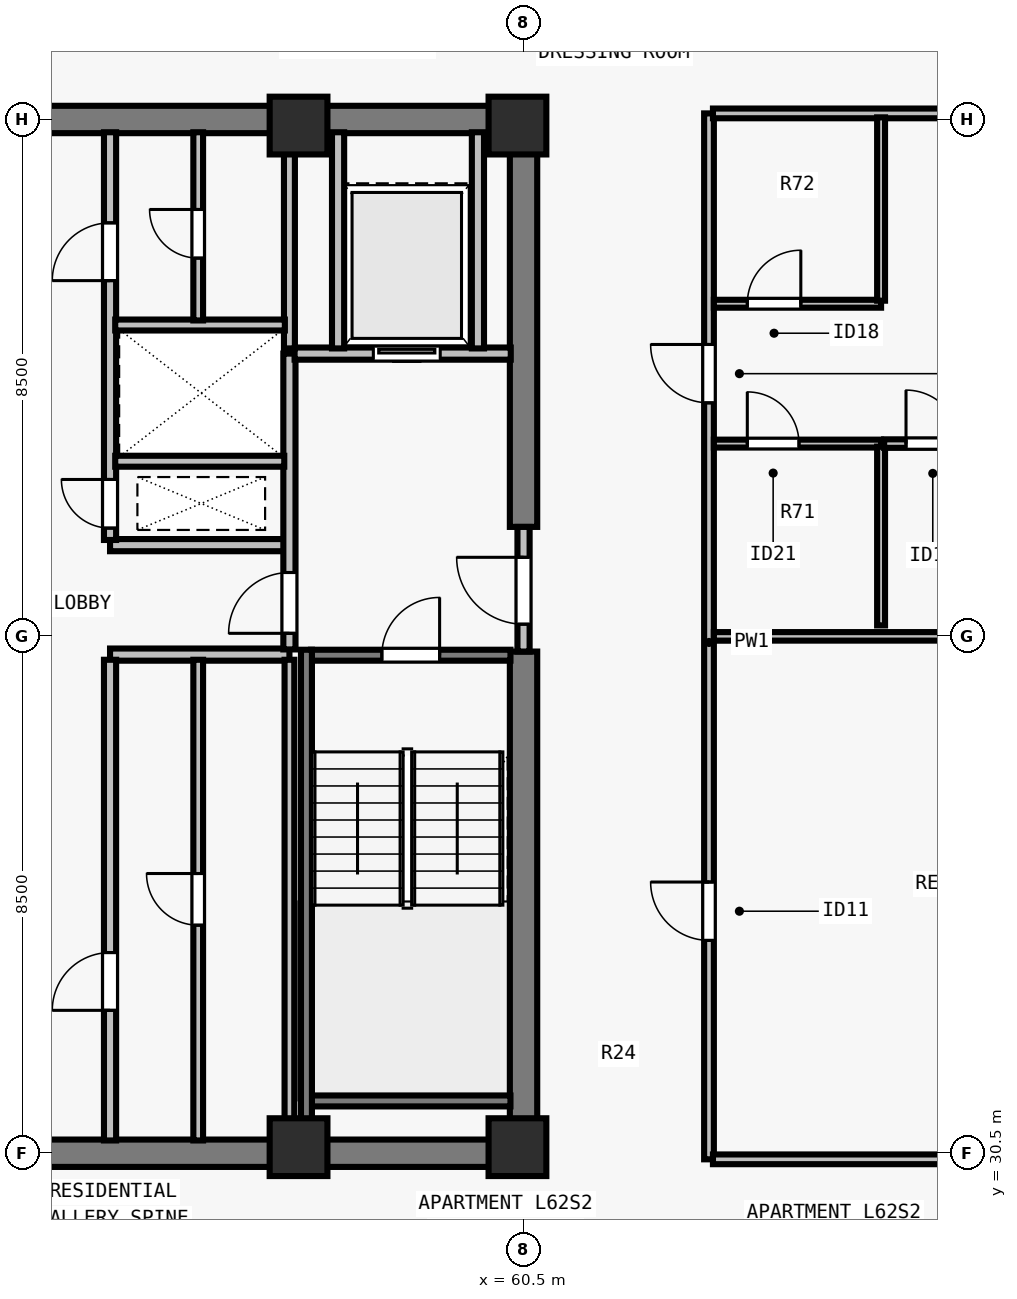
"""IFC4 building model, lengths in metres.
Left out: names, types, materials, properties, quantities, classifications, styles, units other than length and angle.
Written with IfcOpenShell. Run it as: python <this file> out.ifc"""

import sys

from ifc_helpers import new_model, si_unit, direction, frame, frame_2d, origin, origin_2d, place, context, subcontext, project, spatial, rectangle, extrude, element, fill, save


model = new_model("IFC4")
c1 = context("Model", 3, precision=1e-05, world=origin(), true_north=direction((0.0, 1.0)))
c2 = subcontext(c1, "Body", "Model", "MODEL_VIEW")
j1 = project(units=[si_unit("LENGTHUNIT", "METRE"), si_unit("PLANEANGLEUNIT", "RADIAN")], contexts=[c1])
p1 = place(None, origin())
s1 = spatial("IfcSite", under=j1, at=p1, CompositionType="ELEMENT")
p2 = place(p1, origin())
s2 = spatial("IfcBuilding", under=s1, at=p2, CompositionType="ELEMENT")
p3 = place(p2, frame((0.0, 0.0, 227.0)))
s3 = spatial("IfcBuildingStorey", under=s2, at=p3, CompositionType="ELEMENT", Elevation=227.0)
for number, where, z_axis, x_axis in (
    (1, (56.8, 30.6, 0.0), (0.0, 0.0, 1.0), (1.0, 0.0, 0.0)),
    (2, (60.4, 30.6, 0.0), (0.0, 0.0, 1.0), (1.0, 0.0, 0.0)),
    (3, (56.8, 47.4, 0.0), (0.0, 0.0, 1.0), (1.0, 0.0, 0.0)),
    (4, (60.4, 47.4, 0.0), (0.0, 0.0, 1.0), (1.0, 0.0, 0.0)),
):
    element("IfcColumn", number, at=place(p3, frame(where, z_axis=z_axis, x_axis=x_axis)), inside=s3, PredefinedType="COLUMN", context=c2, shape_type="SweptSolid", body=[
        extrude(rectangle(XDim=0.95, YDim=0.95, at=origin_2d()), origin(), (0.0, 0.0, 1.0), 3.5),
    ])
for number, where, z_axis, x_axis in (
    (5, (43.275, 30.5, 0.0), (0.0, 0.0, 1.0), (1.0, 0.0, 0.0)),
    (6, (43.275, 47.5, 0.0), (0.0, 0.0, 1.0), (1.0, 0.0, 0.0)),
):
    element("IfcWall", number, at=place(p3, frame(where, z_axis=z_axis, x_axis=x_axis)), inside=s3, PredefinedType="SHEAR", context=c2, shape_type="SweptSolid", body=[
        extrude(rectangle(XDim=17.45, YDim=0.45, at=frame_2d((8.725, 0.0))), origin(), (0.0, 0.0, 1.0), 3.29),
    ])
p4 = place(p3, frame((60.5, 30.715, 0.0), z_axis=(0.0, 0.0, 1.0), x_axis=(0.0, 1.0, 0.0)))
e7 = element("IfcWall", 7, at=p4, inside=s3, PredefinedType="SHEAR", context=c2, shape_type="SweptSolid", body=[
    extrude(rectangle(XDim=8.035, YDim=0.45, at=frame_2d((4.018, 0.0))), origin(), (0.0, 0.0, 1.0), 3.29),
])
p5 = place(p3, frame((60.5, 40.8, 0.0), z_axis=(0.0, 0.0, 1.0), x_axis=(0.0, 1.0, 0.0)))
e8 = element("IfcWall", 8, at=p5, inside=s3, PredefinedType="SHEAR", context=c2, shape_type="SweptSolid", body=[
    extrude(rectangle(XDim=6.485, YDim=0.45, at=frame_2d((3.242, 0.0))), origin(), (0.0, 0.0, 1.0), 3.29),
])
for number, where, z_axis, x_axis in (
    (9, (53.7, 38.7, 0.0), (0.0, 0.0, 1.0), (1.0, 0.0, 0.0)),
    (10, (53.7, 40.5, 0.0), (0.0, 0.0, 1.0), (1.0, 0.0, 0.0)),
):
    element("IfcWall", number, at=place(p3, frame(where, z_axis=z_axis, x_axis=x_axis)), inside=s3, PredefinedType="SOLIDWALL", context=c2, shape_type="SweptSolid", body=[
        extrude(rectangle(XDim=2.95, YDim=0.2, at=frame_2d((1.475, 0.0))), origin(), (0.0, 0.0, 1.0), 3.29),
    ])
p6 = place(p3, frame((53.7, 30.71, 0.0), z_axis=(0.0, 0.0, 1.0), x_axis=(0.0, 1.0, 0.0)))
e11 = element("IfcWall", 11, at=p6, inside=s3, PredefinedType="SOLIDWALL", context=c2, shape_type="SweptSolid", body=[
    extrude(rectangle(XDim=7.905, YDim=0.2, at=frame_2d((3.953, 0.0))), origin(), (0.0, 0.0, 1.0), 3.29),
])
p7 = place(p6, frame((2.14, 0.0, 0.0)))
e12 = element("IfcOpeningElement", 12, at=p7, cuts=e11, PredefinedType="OPENING", context=c2, shape_type="SweptSolid", body=[
    extrude(rectangle(XDim=0.95, YDim=2.12, at=frame_2d((0.475, 1.06))), frame((0.0, 0.11, 0.0), z_axis=(0.0, -1.0, 0.0), x_axis=(1.0, 0.0, 0.0)), (0.0, 0.0, 1.0), 0.22),
])
p8 = place(p3, frame((53.7, 40.585, 0.0), z_axis=(0.0, 0.0, 1.0), x_axis=(0.0, 1.0, 0.0)))
e13 = element("IfcWall", 13, at=p8, inside=s3, PredefinedType="SOLIDWALL", context=c2, shape_type="SweptSolid", body=[
    extrude(rectangle(XDim=6.705, YDim=0.2, at=frame_2d((3.353, 0.0))), origin(), (0.0, 0.0, 1.0), 3.29),
])
p9 = place(p8, frame((0.195, 0.0, 0.0)))
e14 = element("IfcOpeningElement", 14, at=p9, cuts=e13, PredefinedType="OPENING", context=c2, shape_type="SweptSolid", body=[
    extrude(rectangle(XDim=0.8, YDim=2.08, at=frame_2d((0.4, 1.04))), frame((0.0, 0.11, 0.0), z_axis=(0.0, -1.0, 0.0), x_axis=(1.0, 0.0, 0.0)), (0.0, 0.0, 1.0), 0.22),
])
p10 = place(p8, frame((4.265, 0.0, 0.0)))
e15 = element("IfcOpeningElement", 15, at=p10, cuts=e13, PredefinedType="OPENING", context=c2, shape_type="SweptSolid", body=[
    extrude(rectangle(XDim=0.95, YDim=2.12, at=frame_2d((0.475, 1.06))), frame((0.0, 0.11, 0.0), z_axis=(0.0, -1.0, 0.0), x_axis=(1.0, 0.0, 0.0)), (0.0, 0.0, 1.0), 0.22),
])
p11 = place(p3, frame((60.5, 38.75, 0.0), z_axis=(0.0, 0.0, 1.0), x_axis=(0.0, 1.0, 0.0)))
e16 = element("IfcWall", 16, at=p11, inside=s3, PredefinedType="SOLIDWALL", context=c2, shape_type="SweptSolid", body=[
    extrude(rectangle(XDim=2.05, YDim=0.2, at=frame_2d((1.025, 0.0))), origin(), (0.0, 0.0, 1.0), 3.29),
])
p12 = place(p11, frame((0.45, 0.0, 0.0)))
e17 = element("IfcOpeningElement", 17, at=p12, cuts=e16, PredefinedType="OPENING", context=c2, shape_type="SweptSolid", body=[
    extrude(rectangle(XDim=1.1, YDim=2.15, at=frame_2d((0.55, 1.075))), frame((0.0, 0.11, 0.0), z_axis=(0.0, -1.0, 0.0), x_axis=(1.0, 0.0, 0.0)), (0.0, 0.0, 1.0), 0.22),
])
p13 = place(p3, frame((56.65, 38.785, 0.0), z_axis=(0.0, 0.0, 1.0), x_axis=(0.0, 1.0, 0.0)))
e18 = element("IfcWall", 18, at=p13, inside=s3, PredefinedType="SOLIDWALL", context=c2, shape_type="SweptSolid", body=[
    extrude(rectangle(XDim=4.865, YDim=0.2, at=frame_2d((2.433, 0.0))), origin(), (0.0, 0.0, 1.0), 3.29),
])
p14 = place(p13, frame((0.265, 0.0, 0.0)))
e19 = element("IfcOpeningElement", 19, at=p14, cuts=e18, PredefinedType="OPENING", context=c2, shape_type="SweptSolid", body=[
    extrude(rectangle(XDim=1.0, YDim=2.15, at=frame_2d((0.5, 1.075))), frame((0.0, 0.11, 0.0), z_axis=(0.0, -1.0, 0.0), x_axis=(1.0, 0.0, 0.0)), (0.0, 0.0, 1.0), 0.22),
])
p15 = place(p3, frame((56.735, 43.65, 0.0), z_axis=(0.0, 0.0, 1.0), x_axis=(1.0, 0.0, 0.0)))
e20 = element("IfcWall", 20, at=p15, inside=s3, PredefinedType="SOLIDWALL", context=c2, shape_type="SweptSolid", body=[
    extrude(rectangle(XDim=3.555, YDim=0.2, at=frame_2d((1.777, 0.0))), origin(), (0.0, 0.0, 1.0), 3.29),
])
p16 = place(p15, frame((1.295, 0.0, 0.0)))
e21 = element("IfcOpeningElement", 21, at=p16, cuts=e20, PredefinedType="OPENING", context=c2, shape_type="SweptSolid", body=[
    extrude(rectangle(XDim=1.1, YDim=2.2, at=frame_2d((0.55, 1.1))), frame((0.0, 0.11, 0.0), z_axis=(0.0, -1.0, 0.0), x_axis=(1.0, 0.0, 0.0)), (0.0, 0.0, 1.0), 0.22),
])
for number, where, z_axis, x_axis in (
    (22, (57.45, 43.735, 0.0), (0.0, 0.0, 1.0), (0.0, 1.0, 0.0)),
    (23, (59.75, 43.735, 0.0), (0.0, 0.0, 1.0), (0.0, 1.0, 0.0)),
):
    element("IfcWall", number, at=place(p3, frame(where, z_axis=z_axis, x_axis=x_axis)), inside=s3, PredefinedType="SOLIDWALL", context=c2, shape_type="SweptSolid", body=[
        extrude(rectangle(XDim=3.555, YDim=0.2, at=frame_2d((1.777, 0.0))), origin(), (0.0, 0.0, 1.0), 3.29),
    ])
p17 = place(p3, frame((56.65, 30.71, 0.0), z_axis=(0.0, 0.0, 1.0), x_axis=(0.0, 1.0, 0.0)))
e24 = element("IfcWall", 24, at=p17, inside=s3, PredefinedType="PARTITIONING", context=c2, shape_type="SweptSolid", body=[
    extrude(rectangle(XDim=7.905, YDim=0.16, at=frame_2d((3.953, 0.0))), origin(), (0.0, 0.0, 1.0), 3.29),
])
p18 = place(p3, frame((55.15, 30.71, 0.0), z_axis=(0.0, 0.0, 1.0), x_axis=(0.0, 1.0, 0.0)))
e25 = element("IfcWall", 25, at=p18, inside=s3, PredefinedType="PARTITIONING", context=c2, shape_type="SweptSolid", body=[
    extrude(rectangle(XDim=7.905, YDim=0.16, at=frame_2d((3.953, 0.0))), origin(), (0.0, 0.0, 1.0), 3.29),
])
p19 = place(p18, frame((3.54, 0.0, 0.0)))
e26 = element("IfcOpeningElement", 26, at=p19, cuts=e25, PredefinedType="OPENING", context=c2, shape_type="SweptSolid", body=[
    extrude(rectangle(XDim=0.85, YDim=2.12, at=frame_2d((0.425, 1.06))), frame((0.0, 0.09, 0.0), z_axis=(0.0, -1.0, 0.0), x_axis=(1.0, 0.0, 0.0)), (0.0, 0.0, 1.0), 0.18),
])
p20 = place(p3, frame((56.65, 43.735, 0.0), z_axis=(0.0, 0.0, 1.0), x_axis=(0.0, 1.0, 0.0)))
e27 = element("IfcWall", 27, at=p20, inside=s3, PredefinedType="SOLIDWALL", context=c2, shape_type="SweptSolid", body=[
    extrude(rectangle(XDim=3.555, YDim=0.18, at=frame_2d((1.777, 0.0))), origin(), (0.0, 0.0, 1.0), 3.29),
])
p21 = place(p3, frame((53.785, 41.88, 0.0), z_axis=(0.0, 0.0, 1.0), x_axis=(1.0, 0.0, 0.0)))
e28 = element("IfcWall", 28, at=p21, inside=s3, PredefinedType="SOLIDWALL", context=c2, shape_type="SweptSolid", body=[
    extrude(rectangle(XDim=2.78, YDim=0.18, at=frame_2d((1.39, 0.0))), origin(), (0.0, 0.0, 1.0), 3.29),
])
p22 = place(p3, frame((53.785, 44.12, 0.0), z_axis=(0.0, 0.0, 1.0), x_axis=(1.0, 0.0, 0.0)))
e29 = element("IfcWall", 29, at=p22, inside=s3, PredefinedType="SOLIDWALL", context=c2, shape_type="SweptSolid", body=[
    extrude(rectangle(XDim=2.79, YDim=0.18, at=frame_2d((1.395, 0.0))), origin(), (0.0, 0.0, 1.0), 3.29),
])
p23 = place(p3, frame((55.15, 44.195, 0.0), z_axis=(0.0, 0.0, 1.0), x_axis=(0.0, 1.0, 0.0)))
e30 = element("IfcWall", 30, at=p23, inside=s3, PredefinedType="PARTITIONING", context=c2, shape_type="SweptSolid", body=[
    extrude(rectangle(XDim=3.095, YDim=0.16, at=frame_2d((1.547, 0.0))), origin(), (0.0, 0.0, 1.0), 3.29),
])
p24 = place(p23, frame((1.025, 0.0, 0.0)))
e31 = element("IfcOpeningElement", 31, at=p24, cuts=e30, PredefinedType="OPENING", context=c2, shape_type="SweptSolid", body=[
    extrude(rectangle(XDim=0.8, YDim=2.1, at=frame_2d((0.4, 1.05))), frame((0.0, 0.09, 0.0), z_axis=(0.0, -1.0, 0.0), x_axis=(1.0, 0.0, 0.0)), (0.0, 0.0, 1.0), 0.18),
])
p25 = place(p3, frame((63.55, 30.4, 0.0), z_axis=(0.0, 0.0, 1.0), x_axis=(0.0, 1.0, 0.0)))
e32 = element("IfcWall", 32, at=p25, inside=s3, PredefinedType="PARTITIONING", context=c2, shape_type="SweptSolid", body=[
    extrude(rectangle(XDim=17.2, YDim=0.16, at=frame_2d((8.6, 0.0))), origin(), (0.0, 0.0, 1.0), 3.29),
])
p26 = place(p25, frame((3.6, 0.0, 0.0)))
e33 = element("IfcOpeningElement", 33, at=p26, cuts=e32, PredefinedType="OPENING", context=c2, shape_type="SweptSolid", body=[
    extrude(rectangle(XDim=0.96, YDim=2.12, at=frame_2d((0.48, 1.06))), frame((0.0, 0.09, 0.0), z_axis=(0.0, -1.0, 0.0), x_axis=(1.0, 0.0, 0.0)), (0.0, 0.0, 1.0), 0.18),
])
p27 = place(p25, frame((12.44, 0.0, 0.0)))
e34 = element("IfcOpeningElement", 34, at=p27, cuts=e32, PredefinedType="OPENING", context=c2, shape_type="SweptSolid", body=[
    extrude(rectangle(XDim=0.96, YDim=2.18, at=frame_2d((0.48, 1.09))), frame((0.0, 0.09, 0.0), z_axis=(0.0, -1.0, 0.0), x_axis=(1.0, 0.0, 0.0)), (0.0, 0.0, 1.0), 0.18),
])
for number, where, z_axis, x_axis in (
    (35, (63.615, 30.4, 0.0), (0.0, 0.0, 1.0), (1.0, 0.0, 0.0)),
    (36, (63.615, 47.6, 0.0), (0.0, 0.0, 1.0), (1.0, 0.0, 0.0)),
):
    element("IfcWall", number, at=place(p3, frame(where, z_axis=z_axis, x_axis=x_axis)), inside=s3, PredefinedType="PARTITIONING", context=c2, shape_type="SweptSolid", body=[
        extrude(rectangle(XDim=10.58, YDim=0.16, at=frame_2d((5.29, 0.0))), origin(), (0.0, 0.0, 1.0), 3.29),
    ])
p28 = place(p3, frame((63.63, 39.0, 0.0), z_axis=(0.0, 0.0, 1.0), x_axis=(1.0, 0.0, 0.0)))
e37 = element("IfcWall", 37, at=p28, inside=s3, PredefinedType="PARTITIONING", context=c2, shape_type="SweptSolid", body=[
    extrude(rectangle(XDim=10.565, YDim=0.14, at=frame_2d((5.283, 0.0))), origin(), (0.0, 0.0, 1.0), 3.29),
])
p29 = place(p3, frame((63.63, 42.17, 0.0), z_axis=(0.0, 0.0, 1.0), x_axis=(1.0, 0.0, 0.0)))
e38 = element("IfcWall", 38, at=p29, inside=s3, PredefinedType="PLUMBINGWALL", context=c2, shape_type="SweptSolid", body=[
    extrude(rectangle(XDim=2.75, YDim=0.13, at=frame_2d((1.375, 0.0))), origin(), (0.0, 0.0, 1.0), 3.29),
])
p30 = place(p29, frame((0.55, 0.0, 0.0)))
e39 = element("IfcOpeningElement", 39, at=p30, cuts=e38, PredefinedType="OPENING", context=c2, shape_type="SweptSolid", body=[
    extrude(rectangle(XDim=0.85, YDim=2.08, at=frame_2d((0.425, 1.04))), frame((0.0, 0.075, 0.0), z_axis=(0.0, -1.0, 0.0), x_axis=(1.0, 0.0, 0.0)), (0.0, 0.0, 1.0), 0.15),
])
p31 = place(p3, frame((66.38, 39.18, 0.0), z_axis=(0.0, 0.0, 1.0), x_axis=(0.0, 1.0, 0.0)))
e40 = element("IfcWall", 40, at=p31, inside=s3, PredefinedType="PLUMBINGWALL", context=c2, shape_type="SweptSolid", body=[
    extrude(rectangle(XDim=2.94, YDim=0.13, at=frame_2d((1.47, 0.0))), origin(), (0.0, 0.0, 1.0), 3.29),
])
p32 = place(p3, frame((63.63, 44.47, 0.0), z_axis=(0.0, 0.0, 1.0), x_axis=(1.0, 0.0, 0.0)))
e41 = element("IfcWall", 41, at=p32, inside=s3, PredefinedType="PLUMBINGWALL", context=c2, shape_type="SweptSolid", body=[
    extrude(rectangle(XDim=2.75, YDim=0.13, at=frame_2d((1.375, 0.0))), origin(), (0.0, 0.0, 1.0), 3.29),
])
p33 = place(p32, frame((0.55, 0.0, 0.0)))
e42 = element("IfcOpeningElement", 42, at=p33, cuts=e41, PredefinedType="OPENING", context=c2, shape_type="SweptSolid", body=[
    extrude(rectangle(XDim=0.88, YDim=2.1, at=frame_2d((0.44, 1.05))), frame((0.0, 0.075, 0.0), z_axis=(0.0, -1.0, 0.0), x_axis=(1.0, 0.0, 0.0)), (0.0, 0.0, 1.0), 0.15),
])
p34 = place(p3, frame((66.38, 44.52, 0.0), z_axis=(0.0, 0.0, 1.0), x_axis=(0.0, 1.0, 0.0)))
e43 = element("IfcWall", 43, at=p34, inside=s3, PredefinedType="PLUMBINGWALL", context=c2, shape_type="SweptSolid", body=[
    extrude(rectangle(XDim=3.015, YDim=0.13, at=frame_2d((1.507, 0.0))), origin(), (0.0, 0.0, 1.0), 3.29),
])
p35 = place(p3, frame((66.43, 42.17, 0.0), z_axis=(0.0, 0.0, 1.0), x_axis=(1.0, 0.0, 0.0)))
e44 = element("IfcWall", 44, at=p35, inside=s3, PredefinedType="PARTITIONING", context=c2, shape_type="SweptSolid", body=[
    extrude(rectangle(XDim=7.69, YDim=0.14, at=frame_2d((3.845, 0.0))), origin(), (0.0, 0.0, 1.0), 3.29),
])
p36 = place(p35, frame((0.36, 0.0, 0.0)))
e45 = element("IfcOpeningElement", 45, at=p36, cuts=e44, PredefinedType="OPENING", context=c2, shape_type="SweptSolid", body=[
    extrude(rectangle(XDim=0.88, YDim=2.1, at=frame_2d((0.44, 1.05))), frame((0.0, 0.08, 0.0), z_axis=(0.0, -1.0, 0.0), x_axis=(1.0, 0.0, 0.0)), (0.0, 0.0, 1.0), 0.16),
])
p37 = place(p3, frame((57.005, 38.69, 0.0), z_axis=(0.0, 0.0, 1.0), x_axis=(1.0, 0.0, 0.0)))
e46 = element("IfcWall", 46, at=p37, inside=s3, PredefinedType="SOLIDWALL", context=c2, shape_type="SweptSolid", body=[
    extrude(rectangle(XDim=3.28, YDim=0.18, at=frame_2d((1.64, 0.0))), origin(), (0.0, 0.0, 1.0), 3.29),
])
p38 = place(p37, frame((1.165, 0.0, 0.0)))
e47 = element("IfcOpeningElement", 47, at=p38, cuts=e46, PredefinedType="OPENING", context=c2, shape_type="SweptSolid", body=[
    extrude(rectangle(XDim=0.95, YDim=2.15, at=frame_2d((0.475, 1.075))), frame((0.0, 0.1, 0.0), z_axis=(0.0, -1.0, 0.0), x_axis=(1.0, 0.0, 0.0)), (0.0, 0.0, 1.0), 0.2),
])
p39 = place(p3, frame((57.005, 31.36, 0.0), z_axis=(0.0, 0.0, 1.0), x_axis=(1.0, 0.0, 0.0)))
e48 = element("IfcWall", 48, at=p39, inside=s3, PredefinedType="SOLIDWALL", context=c2, shape_type="SweptSolid", body=[
    extrude(rectangle(XDim=3.28, YDim=0.18, at=frame_2d((1.64, 0.0))), origin(), (0.0, 0.0, 1.0), 3.29),
])
p40 = place(p3, frame((56.93, 38.78, 0.0), z_axis=(0.0, 0.0, 1.0), x_axis=(0.0, -1.0, 0.0)))
e49 = element("IfcWall", 49, at=p40, inside=s3, PredefinedType="SOLIDWALL", context=c2, shape_type="SweptSolid", body=[
    extrude(rectangle(XDim=8.067, YDim=0.18, at=frame_2d((4.034, 0.0))), origin(), (0.0, 0.0, 1.0), 3.29),
])
p41 = place(p12, origin())
e50 = element("IfcDoor", 50, at=p41, inside=s3, OperationType="SINGLE_SWING_RIGHT", PredefinedType="DOOR", context=c2, shape_type="SweptSolid", body=[
    extrude(rectangle(XDim=1.1, YDim=2.15, at=frame_2d((0.55, 1.075))), frame((0.0, 0.025, 0.0), z_axis=(0.0, -1.0, 0.0), x_axis=(1.0, 0.0, 0.0)), (0.0, 0.0, 1.0), 0.05),
])
fill(e17, e50)
p42 = place(p14, origin())
e51 = element("IfcDoor", 51, at=p42, inside=s3, OperationType="SINGLE_SWING_LEFT", PredefinedType="DOOR", context=c2, shape_type="SweptSolid", body=[
    extrude(rectangle(XDim=1.0, YDim=2.15, at=frame_2d((0.5, 1.075))), frame((0.0, 0.025, 0.0), z_axis=(0.0, -1.0, 0.0), x_axis=(1.0, 0.0, 0.0)), (0.0, 0.0, 1.0), 0.05),
])
fill(e19, e51)
p43 = place(p16, origin())
e52 = element("IfcDoor", 52, at=p43, inside=s3, OperationType="SLIDING_TO_LEFT", PredefinedType="DOOR", context=c2, shape_type="SweptSolid", body=[
    extrude(rectangle(XDim=1.1, YDim=2.2, at=frame_2d((0.55, 1.1))), frame((0.0, 0.025, 0.0), z_axis=(0.0, -1.0, 0.0), x_axis=(1.0, 0.0, 0.0)), (0.0, 0.0, 1.0), 0.05),
])
fill(e21, e52)
p44 = place(p7, origin())
e53 = element("IfcDoor", 53, at=p44, inside=s3, OperationType="SINGLE_SWING_LEFT", PredefinedType="DOOR", context=c2, shape_type="SweptSolid", body=[
    extrude(rectangle(XDim=0.95, YDim=2.12, at=frame_2d((0.475, 1.06))), frame((0.0, 0.025, 0.0), z_axis=(0.0, -1.0, 0.0), x_axis=(1.0, 0.0, 0.0)), (0.0, 0.0, 1.0), 0.05),
])
fill(e12, e53)
p45 = place(p19, origin())
e54 = element("IfcDoor", 54, at=p45, inside=s3, OperationType="SINGLE_SWING_RIGHT", PredefinedType="DOOR", context=c2, shape_type="SweptSolid", body=[
    extrude(rectangle(XDim=0.85, YDim=2.12, at=frame_2d((0.425, 1.06))), frame((0.0, 0.025, 0.0), z_axis=(0.0, -1.0, 0.0), x_axis=(1.0, 0.0, 0.0)), (0.0, 0.0, 1.0), 0.05),
])
fill(e26, e54)
p46 = place(p9, origin())
e55 = element("IfcDoor", 55, at=p46, inside=s3, OperationType="SINGLE_SWING_RIGHT", PredefinedType="DOOR", context=c2, shape_type="SweptSolid", body=[
    extrude(rectangle(XDim=0.8, YDim=2.08, at=frame_2d((0.4, 1.04))), frame((0.0, 0.025, 0.0), z_axis=(0.0, -1.0, 0.0), x_axis=(1.0, 0.0, 0.0)), (0.0, 0.0, 1.0), 0.05),
])
fill(e14, e55)
p47 = place(p10, origin())
e56 = element("IfcDoor", 56, at=p47, inside=s3, OperationType="SINGLE_SWING_LEFT", PredefinedType="DOOR", context=c2, shape_type="SweptSolid", body=[
    extrude(rectangle(XDim=0.95, YDim=2.12, at=frame_2d((0.475, 1.06))), frame((0.0, 0.025, 0.0), z_axis=(0.0, -1.0, 0.0), x_axis=(1.0, 0.0, 0.0)), (0.0, 0.0, 1.0), 0.05),
])
fill(e15, e56)
p48 = place(p24, origin())
e57 = element("IfcDoor", 57, at=p48, inside=s3, OperationType="SINGLE_SWING_RIGHT", PredefinedType="DOOR", context=c2, shape_type="SweptSolid", body=[
    extrude(rectangle(XDim=0.8, YDim=2.1, at=frame_2d((0.4, 1.05))), frame((0.0, 0.025, 0.0), z_axis=(0.0, -1.0, 0.0), x_axis=(1.0, 0.0, 0.0)), (0.0, 0.0, 1.0), 0.05),
])
fill(e31, e57)
p49 = place(p26, origin())
e58 = element("IfcDoor", 58, at=p49, inside=s3, OperationType="SINGLE_SWING_RIGHT", PredefinedType="DOOR", context=c2, shape_type="SweptSolid", body=[
    extrude(rectangle(XDim=0.96, YDim=2.12, at=frame_2d((0.48, 1.06))), frame((0.0, 0.025, 0.0), z_axis=(0.0, -1.0, 0.0), x_axis=(1.0, 0.0, 0.0)), (0.0, 0.0, 1.0), 0.05),
])
fill(e33, e58)
p50 = place(p30, origin())
e59 = element("IfcDoor", 59, at=p50, inside=s3, OperationType="SINGLE_SWING_LEFT", PredefinedType="DOOR", context=c2, shape_type="SweptSolid", body=[
    extrude(rectangle(XDim=0.85, YDim=2.08, at=frame_2d((0.425, 1.04))), frame((0.0, 0.025, 0.0), z_axis=(0.0, -1.0, 0.0), x_axis=(1.0, 0.0, 0.0)), (0.0, 0.0, 1.0), 0.05),
])
fill(e39, e59)
p51 = place(p33, origin())
e60 = element("IfcDoor", 60, at=p51, inside=s3, OperationType="SINGLE_SWING_RIGHT", PredefinedType="DOOR", context=c2, shape_type="SweptSolid", body=[
    extrude(rectangle(XDim=0.88, YDim=2.1, at=frame_2d((0.44, 1.05))), frame((0.0, 0.025, 0.0), z_axis=(0.0, -1.0, 0.0), x_axis=(1.0, 0.0, 0.0)), (0.0, 0.0, 1.0), 0.05),
])
fill(e42, e60)
p52 = place(p36, origin())
e61 = element("IfcDoor", 61, at=p52, inside=s3, OperationType="SINGLE_SWING_LEFT", PredefinedType="DOOR", context=c2, shape_type="SweptSolid", body=[
    extrude(rectangle(XDim=0.88, YDim=2.1, at=frame_2d((0.44, 1.05))), frame((0.0, 0.025, 0.0), z_axis=(0.0, -1.0, 0.0), x_axis=(1.0, 0.0, 0.0)), (0.0, 0.0, 1.0), 0.05),
])
fill(e45, e61)
p53 = place(p27, origin())
e62 = element("IfcDoor", 62, at=p53, inside=s3, OperationType="SINGLE_SWING_RIGHT", PredefinedType="DOOR", context=c2, shape_type="SweptSolid", body=[
    extrude(rectangle(XDim=0.96, YDim=2.18, at=frame_2d((0.48, 1.09))), frame((0.0, 0.025, 0.0), z_axis=(0.0, -1.0, 0.0), x_axis=(1.0, 0.0, 0.0)), (0.0, 0.0, 1.0), 0.05),
])
fill(e34, e62)
p54 = place(p38, origin())
e63 = element("IfcDoor", 63, at=p54, inside=s3, OperationType="SINGLE_SWING_RIGHT", PredefinedType="DOOR", context=c2, shape_type="SweptSolid", body=[
    extrude(rectangle(XDim=0.95, YDim=2.15, at=frame_2d((0.475, 1.075))), frame((0.0, 0.025, 0.0), z_axis=(0.0, -1.0, 0.0), x_axis=(1.0, 0.0, 0.0)), (0.0, 0.0, 1.0), 0.05),
])
fill(e47, e63)
save(model, sys.argv[1])
